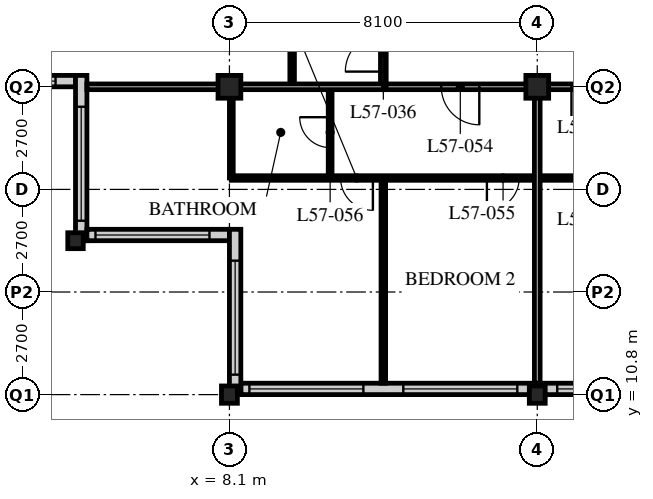
"""IFC4 building model, lengths in metres.
Left out: names, types, materials, properties, quantities, classifications, styles, units other than length and angle.
Written with IfcOpenShell. Run it as: python <this file> out.ifc"""

import sys

from ifc_helpers import new_model, si_unit, direction, frame, frame_2d, origin, origin_2d, place, context, subcontext, project, spatial, rectangle, hollow_rectangle, i_section, extrude, element, fill, save


model = new_model("IFC4")
c1 = context("Model", 3, precision=1e-05, world=origin(), true_north=direction((0.0, 1.0)))
c2 = subcontext(c1, "Body", "Model", "MODEL_VIEW")
j1 = project(units=[si_unit("LENGTHUNIT", "METRE"), si_unit("PLANEANGLEUNIT", "RADIAN")], contexts=[c1])
p1 = place(None, origin())
s1 = spatial("IfcSite", under=j1, at=p1, CompositionType="ELEMENT")
p2 = place(p1, origin())
s2 = spatial("IfcBuilding", under=s1, at=p2, CompositionType="ELEMENT")
p3 = place(p2, frame((0.0, 0.0, 220.8)))
s3 = spatial("IfcBuildingStorey", under=s2, at=p3, CompositionType="ELEMENT", Elevation=220.8)
p4 = place(p3, frame((4.05, 14.85, 0.0), z_axis=(0.0, 0.0, 1.0), x_axis=(1.0, 0.0, 0.0)))
e1 = element("IfcColumn", 1, at=p4, inside=s3, PredefinedType="COLUMN", context=c2, shape_type="SweptSolid", body=[
    extrude(i_section(OverallWidth=0.407, OverallDepth=0.419, WebThickness=0.031, FlangeThickness=0.049, FilletRadius=0.015, at=origin_2d()), origin(), (0.0, 0.0, 1.0), 3.6),
])
p5 = place(p3, frame((8.1, 10.8, 0.0), z_axis=(0.0, 0.0, 1.0), x_axis=(1.0, 0.0, 0.0)))
e2 = element("IfcColumn", 2, at=p5, inside=s3, PredefinedType="COLUMN", context=c2, shape_type="SweptSolid", body=[
    extrude(i_section(OverallWidth=0.418, OverallDepth=0.456, WebThickness=0.042, FlangeThickness=0.067, FilletRadius=0.015, at=origin_2d()), origin(), (0.0, 0.0, 1.0), 3.6),
])
p6 = place(p3, frame((8.1, 18.9, 0.0), z_axis=(0.0, 0.0, 1.0), x_axis=(1.0, 0.0, 0.0)))
e3 = element("IfcColumn", 3, at=p6, inside=s3, PredefinedType="COLUMN", context=c2, shape_type="SweptSolid", body=[
    extrude(hollow_rectangle(XDim=0.6, YDim=0.6, WallThickness=0.05, at=origin_2d()), origin(), (0.0, 0.0, 1.0), 3.6),
])
p7 = place(p3, frame((16.2, 10.8, 0.0), z_axis=(0.0, 0.0, 1.0), x_axis=(1.0, 0.0, 0.0)))
e4 = element("IfcColumn", 4, at=p7, inside=s3, PredefinedType="COLUMN", context=c2, shape_type="SweptSolid", body=[
    extrude(i_section(OverallWidth=0.418, OverallDepth=0.456, WebThickness=0.042, FlangeThickness=0.067, FilletRadius=0.015, at=origin_2d()), origin(), (0.0, 0.0, 1.0), 3.6),
])
p8 = place(p3, frame((16.2, 18.9, 0.0), z_axis=(0.0, 0.0, 1.0), x_axis=(1.0, 0.0, 0.0)))
e5 = element("IfcColumn", 5, at=p8, inside=s3, PredefinedType="COLUMN", context=c2, shape_type="SweptSolid", body=[
    extrude(hollow_rectangle(XDim=0.6, YDim=0.6, WallThickness=0.05, at=origin_2d()), origin(), (0.0, 0.0, 1.0), 3.6),
])
p9 = place(p3, frame((8.4, 10.95, 0.0), z_axis=(0.0, 0.0, 1.0), x_axis=(1.0, 0.0, 0.0)))
e6 = element("IfcWall", 6, at=p9, inside=s3, PredefinedType="SOLIDWALL", context=c2, shape_type="SweptSolid", body=[
    extrude(rectangle(XDim=40.2, YDim=0.3, at=frame_2d((20.1, 0.0))), origin(), (0.0, 0.0, 1.0), 3.39),
])
p10 = place(p9, frame((0.225, 0.0, 0.6)))
e7 = element("IfcOpeningElement", 7, at=p10, cuts=e6, PredefinedType="OPENING", context=c2, shape_type="SweptSolid", body=[
    extrude(rectangle(XDim=3.0, YDim=2.0, at=frame_2d((1.5, 1.0))), frame((0.0, 0.16, 0.0), z_axis=(0.0, -1.0, 0.0), x_axis=(1.0, 0.0, 0.0)), (0.0, 0.0, 1.0), 0.32),
])
p11 = place(p9, frame((4.275, 0.0, 0.6)))
e8 = element("IfcOpeningElement", 8, at=p11, cuts=e6, PredefinedType="OPENING", context=c2, shape_type="SweptSolid", body=[
    extrude(rectangle(XDim=3.0, YDim=2.0, at=frame_2d((1.5, 1.0))), frame((0.0, 0.16, 0.0), z_axis=(0.0, -1.0, 0.0), x_axis=(1.0, 0.0, 0.0)), (0.0, 0.0, 1.0), 0.32),
])
p12 = place(p9, frame((8.325, 0.0, 0.6)))
e9 = element("IfcOpeningElement", 9, at=p12, cuts=e6, PredefinedType="OPENING", context=c2, shape_type="SweptSolid", body=[
    extrude(rectangle(XDim=3.0, YDim=2.0, at=frame_2d((1.5, 1.0))), frame((0.0, 0.16, 0.0), z_axis=(0.0, -1.0, 0.0), x_axis=(1.0, 0.0, 0.0)), (0.0, 0.0, 1.0), 0.32),
])
p13 = place(p9, frame((12.375, 0.0, 0.6)))
e10 = element("IfcOpeningElement", 10, at=p13, cuts=e6, PredefinedType="OPENING", context=c2, shape_type="SweptSolid", body=[
    extrude(rectangle(XDim=3.0, YDim=2.0, at=frame_2d((1.5, 1.0))), frame((0.0, 0.16, 0.0), z_axis=(0.0, -1.0, 0.0), x_axis=(1.0, 0.0, 0.0)), (0.0, 0.0, 1.0), 0.32),
])
p14 = place(p9, frame((16.425, 0.0, 0.6)))
e11 = element("IfcOpeningElement", 11, at=p14, cuts=e6, PredefinedType="OPENING", context=c2, shape_type="SweptSolid", body=[
    extrude(rectangle(XDim=3.0, YDim=2.0, at=frame_2d((1.5, 1.0))), frame((0.0, 0.16, 0.0), z_axis=(0.0, -1.0, 0.0), x_axis=(1.0, 0.0, 0.0)), (0.0, 0.0, 1.0), 0.32),
])
p15 = place(p9, frame((20.475, 0.0, 0.6)))
e12 = element("IfcOpeningElement", 12, at=p15, cuts=e6, PredefinedType="OPENING", context=c2, shape_type="SweptSolid", body=[
    extrude(rectangle(XDim=3.0, YDim=2.0, at=frame_2d((1.5, 1.0))), frame((0.0, 0.16, 0.0), z_axis=(0.0, -1.0, 0.0), x_axis=(1.0, 0.0, 0.0)), (0.0, 0.0, 1.0), 0.32),
])
p16 = place(p9, frame((24.525, 0.0, 0.6)))
e13 = element("IfcOpeningElement", 13, at=p16, cuts=e6, PredefinedType="OPENING", context=c2, shape_type="SweptSolid", body=[
    extrude(rectangle(XDim=3.0, YDim=2.0, at=frame_2d((1.5, 1.0))), frame((0.0, 0.16, 0.0), z_axis=(0.0, -1.0, 0.0), x_axis=(1.0, 0.0, 0.0)), (0.0, 0.0, 1.0), 0.32),
])
p17 = place(p9, frame((28.575, 0.0, 0.6)))
e14 = element("IfcOpeningElement", 14, at=p17, cuts=e6, PredefinedType="OPENING", context=c2, shape_type="SweptSolid", body=[
    extrude(rectangle(XDim=3.0, YDim=2.0, at=frame_2d((1.5, 1.0))), frame((0.0, 0.16, 0.0), z_axis=(0.0, -1.0, 0.0), x_axis=(1.0, 0.0, 0.0)), (0.0, 0.0, 1.0), 0.32),
])
p18 = place(p9, frame((32.625, 0.0, 0.6)))
e15 = element("IfcOpeningElement", 15, at=p18, cuts=e6, PredefinedType="OPENING", context=c2, shape_type="SweptSolid", body=[
    extrude(rectangle(XDim=3.0, YDim=2.0, at=frame_2d((1.5, 1.0))), frame((0.0, 0.16, 0.0), z_axis=(0.0, -1.0, 0.0), x_axis=(1.0, 0.0, 0.0)), (0.0, 0.0, 1.0), 0.32),
])
p19 = place(p9, frame((36.675, 0.0, 0.6)))
e16 = element("IfcOpeningElement", 16, at=p19, cuts=e6, PredefinedType="OPENING", context=c2, shape_type="SweptSolid", body=[
    extrude(rectangle(XDim=3.0, YDim=2.0, at=frame_2d((1.5, 1.0))), frame((0.0, 0.16, 0.0), z_axis=(0.0, -1.0, 0.0), x_axis=(1.0, 0.0, 0.0)), (0.0, 0.0, 1.0), 0.32),
])
p20 = place(p3, frame((0.3, 19.05, 0.0), z_axis=(0.0, 0.0, 1.0), x_axis=(1.0, 0.0, 0.0)))
e17 = element("IfcWall", 17, at=p20, inside=s3, PredefinedType="SOLIDWALL", context=c2, shape_type="SweptSolid", body=[
    extrude(rectangle(XDim=3.75, YDim=0.3, at=frame_2d((1.875, 0.0))), origin(), (0.0, 0.0, 1.0), 3.39),
])
p21 = place(p20, frame((0.225, 0.0, 0.6)))
e18 = element("IfcOpeningElement", 18, at=p21, cuts=e17, PredefinedType="OPENING", context=c2, shape_type="SweptSolid", body=[
    extrude(rectangle(XDim=3.0, YDim=2.0, at=frame_2d((1.5, 1.0))), frame((0.0, 0.16, 0.0), z_axis=(0.0, -1.0, 0.0), x_axis=(1.0, 0.0, 0.0)), (0.0, 0.0, 1.0), 0.32),
])
p22 = place(p3, frame((4.2, 19.2, 0.0), z_axis=(0.0, 0.0, 1.0), x_axis=(0.0, -1.0, 0.0)))
e19 = element("IfcWall", 19, at=p22, inside=s3, PredefinedType="SOLIDWALL", context=c2, shape_type="SweptSolid", body=[
    extrude(rectangle(XDim=4.35, YDim=0.3, at=frame_2d((2.175, 0.0))), origin(), (0.0, 0.0, 1.0), 3.39),
])
p23 = place(p22, frame((0.825, 0.0, 0.6)))
e20 = element("IfcOpeningElement", 20, at=p23, cuts=e19, PredefinedType="OPENING", context=c2, shape_type="SweptSolid", body=[
    extrude(rectangle(XDim=3.0, YDim=2.0, at=frame_2d((1.5, 1.0))), frame((0.0, 0.16, 0.0), z_axis=(0.0, -1.0, 0.0), x_axis=(1.0, 0.0, 0.0)), (0.0, 0.0, 1.0), 0.32),
])
p24 = place(p3, frame((4.35, 15.0, 0.0), z_axis=(0.0, 0.0, 1.0), x_axis=(1.0, 0.0, 0.0)))
e21 = element("IfcWall", 21, at=p24, inside=s3, PredefinedType="SOLIDWALL", context=c2, shape_type="SweptSolid", body=[
    extrude(rectangle(XDim=3.75, YDim=0.3, at=frame_2d((1.875, 0.0))), origin(), (0.0, 0.0, 1.0), 3.39),
])
p25 = place(p24, frame((0.225, 0.0, 0.6)))
e22 = element("IfcOpeningElement", 22, at=p25, cuts=e21, PredefinedType="OPENING", context=c2, shape_type="SweptSolid", body=[
    extrude(rectangle(XDim=3.0, YDim=2.0, at=frame_2d((1.5, 1.0))), frame((0.0, 0.16, 0.0), z_axis=(0.0, -1.0, 0.0), x_axis=(1.0, 0.0, 0.0)), (0.0, 0.0, 1.0), 0.32),
])
p26 = place(p3, frame((8.25, 15.15, 0.0), z_axis=(0.0, 0.0, 1.0), x_axis=(0.0, -1.0, 0.0)))
e23 = element("IfcWall", 23, at=p26, inside=s3, PredefinedType="SOLIDWALL", context=c2, shape_type="SweptSolid", body=[
    extrude(rectangle(XDim=4.35, YDim=0.3, at=frame_2d((2.175, 0.0))), origin(), (0.0, 0.0, 1.0), 3.39),
])
p27 = place(p26, frame((0.825, 0.0, 0.6)))
e24 = element("IfcOpeningElement", 24, at=p27, cuts=e23, PredefinedType="OPENING", context=c2, shape_type="SweptSolid", body=[
    extrude(rectangle(XDim=3.0, YDim=2.0, at=frame_2d((1.5, 1.0))), frame((0.0, 0.16, 0.0), z_axis=(0.0, -1.0, 0.0), x_axis=(1.0, 0.0, 0.0)), (0.0, 0.0, 1.0), 0.32),
])
p28 = place(p3, frame((12.15, 18.9, 0.0), z_axis=(0.0, 0.0, 1.0), x_axis=(1.0, 0.0, 0.0)))
e25 = element("IfcWall", 25, at=p28, inside=s3, PredefinedType="PARTITIONING", context=c2, shape_type="SweptSolid", body=[
    extrude(rectangle(XDim=36.45, YDim=0.15, at=frame_2d((18.225, 0.0))), origin(), (0.0, 0.0, 1.0), 2.628),
])
p29 = place(p28, frame((4.95, 0.0, 0.0)))
e26 = element("IfcOpeningElement", 26, at=p29, cuts=e25, PredefinedType="OPENING", context=c2, shape_type="SweptSolid", body=[
    extrude(rectangle(XDim=1.0, YDim=2.1, at=frame_2d((0.5, 1.05))), frame((0.0, 0.085, 0.0), z_axis=(0.0, -1.0, 0.0), x_axis=(1.0, 0.0, 0.0)), (0.0, 0.0, 1.0), 0.17),
])
p30 = place(p28, frame((22.6, 0.0, 0.0)))
e27 = element("IfcOpeningElement", 27, at=p30, cuts=e25, PredefinedType="OPENING", context=c2, shape_type="SweptSolid", body=[
    extrude(rectangle(XDim=1.0, YDim=2.1, at=frame_2d((0.5, 1.05))), frame((0.0, 0.085, 0.0), z_axis=(0.0, -1.0, 0.0), x_axis=(1.0, 0.0, 0.0)), (0.0, 0.0, 1.0), 0.17),
])
p31 = place(p28, frame((25.0, 0.0, 0.0)))
e28 = element("IfcOpeningElement", 28, at=p31, cuts=e25, PredefinedType="OPENING", context=c2, shape_type="SweptSolid", body=[
    extrude(rectangle(XDim=1.0, YDim=2.1, at=frame_2d((0.5, 1.05))), frame((0.0, 0.085, 0.0), z_axis=(0.0, -1.0, 0.0), x_axis=(1.0, 0.0, 0.0)), (0.0, 0.0, 1.0), 0.17),
])
p32 = place(p28, frame((30.7, 0.0, 0.0)))
e29 = element("IfcOpeningElement", 29, at=p32, cuts=e25, PredefinedType="OPENING", context=c2, shape_type="SweptSolid", body=[
    extrude(rectangle(XDim=1.0, YDim=2.1, at=frame_2d((0.5, 1.05))), frame((0.0, 0.085, 0.0), z_axis=(0.0, -1.0, 0.0), x_axis=(1.0, 0.0, 0.0)), (0.0, 0.0, 1.0), 0.17),
])
p33 = place(p28, frame((1.525, 0.0, 0.0)))
e30 = element("IfcOpeningElement", 30, at=p33, cuts=e25, PredefinedType="OPENING", context=c2, shape_type="SweptSolid", body=[
    extrude(rectangle(XDim=1.0, YDim=2.1, at=frame_2d((0.5, 1.05))), frame((0.0, 0.085, 0.0), z_axis=(0.0, -1.0, 0.0), x_axis=(1.0, 0.0, 0.0)), (0.0, 0.0, 1.0), 0.17),
])
p34 = place(p28, frame((32.825, 0.0, 0.0)))
e31 = element("IfcOpeningElement", 31, at=p34, cuts=e25, PredefinedType="OPENING", context=c2, shape_type="SweptSolid", body=[
    extrude(rectangle(XDim=1.0, YDim=2.1, at=frame_2d((0.5, 1.05))), frame((0.0, 0.085, 0.0), z_axis=(0.0, -1.0, 0.0), x_axis=(1.0, 0.0, 0.0)), (0.0, 0.0, 1.0), 0.17),
])
p35 = place(p3, frame((12.15, 18.9, 0.0), z_axis=(0.0, 0.0, 1.0), x_axis=(0.0, 1.0, 0.0)))
e32 = element("IfcWall", 32, at=p35, inside=s3, PredefinedType="PARTITIONING", context=c2, shape_type="SweptSolid", body=[
    extrude(rectangle(XDim=24.3, YDim=0.15, at=frame_2d((12.15, 0.0))), origin(), (0.0, 0.0, 1.0), 3.39),
])
p36 = place(p35, frame((0.4, 0.0, 0.0)))
e33 = element("IfcOpeningElement", 33, at=p36, cuts=e32, PredefinedType="OPENING", context=c2, shape_type="SweptSolid", body=[
    extrude(rectangle(XDim=1.0, YDim=2.1, at=frame_2d((0.5, 1.05))), frame((0.0, 0.085, 0.0), z_axis=(0.0, -1.0, 0.0), x_axis=(1.0, 0.0, 0.0)), (0.0, 0.0, 1.0), 0.17),
])
p37 = place(p35, frame((16.6, 0.0, 0.0)))
e34 = element("IfcOpeningElement", 34, at=p37, cuts=e32, PredefinedType="OPENING", context=c2, shape_type="SweptSolid", body=[
    extrude(rectangle(XDim=1.0, YDim=2.1, at=frame_2d((0.5, 1.05))), frame((0.0, 0.085, 0.0), z_axis=(0.0, -1.0, 0.0), x_axis=(1.0, 0.0, 0.0)), (0.0, 0.0, 1.0), 0.17),
])
p38 = place(p3, frame((9.75, 18.9, 0.0), z_axis=(0.0, 0.0, 1.0), x_axis=(0.0, 1.0, 0.0)))
e35 = element("IfcWall", 35, at=p38, inside=s3, PredefinedType="PARTITIONING", context=c2, shape_type="SweptSolid", body=[
    extrude(rectangle(XDim=24.3, YDim=0.12, at=frame_2d((12.15, 0.0))), origin(), (0.0, 0.0, 1.0), 3.39),
])
p39 = place(p38, frame((0.975, 0.0, 0.0)))
e36 = element("IfcOpeningElement", 36, at=p39, cuts=e35, PredefinedType="OPENING", context=c2, shape_type="SweptSolid", body=[
    extrude(rectangle(XDim=0.85, YDim=2.1, at=frame_2d((0.425, 1.05))), frame((0.0, 0.07, 0.0), z_axis=(0.0, -1.0, 0.0), x_axis=(1.0, 0.0, 0.0)), (0.0, 0.0, 1.0), 0.14),
])
p40 = place(p38, frame((8.425, 0.0, 0.0)))
e37 = element("IfcOpeningElement", 37, at=p40, cuts=e35, PredefinedType="OPENING", context=c2, shape_type="SweptSolid", body=[
    extrude(rectangle(XDim=0.85, YDim=2.1, at=frame_2d((0.425, 1.05))), frame((0.0, 0.07, 0.0), z_axis=(0.0, -1.0, 0.0), x_axis=(1.0, 0.0, 0.0)), (0.0, 0.0, 1.0), 0.14),
])
p41 = place(p38, frame((12.475, 0.0, 0.0)))
e38 = element("IfcOpeningElement", 38, at=p41, cuts=e35, PredefinedType="OPENING", context=c2, shape_type="SweptSolid", body=[
    extrude(rectangle(XDim=0.85, YDim=2.1, at=frame_2d((0.425, 1.05))), frame((0.0, 0.07, 0.0), z_axis=(0.0, -1.0, 0.0), x_axis=(1.0, 0.0, 0.0)), (0.0, 0.0, 1.0), 0.14),
])
p42 = place(p38, frame((17.175, 0.0, 0.0)))
e39 = element("IfcOpeningElement", 39, at=p42, cuts=e35, PredefinedType="OPENING", context=c2, shape_type="SweptSolid", body=[
    extrude(rectangle(XDim=0.85, YDim=2.1, at=frame_2d((0.425, 1.05))), frame((0.0, 0.07, 0.0), z_axis=(0.0, -1.0, 0.0), x_axis=(1.0, 0.0, 0.0)), (0.0, 0.0, 1.0), 0.14),
])
p43 = place(p38, frame((20.575, 0.0, 0.0)))
e40 = element("IfcOpeningElement", 40, at=p43, cuts=e35, PredefinedType="OPENING", context=c2, shape_type="SweptSolid", body=[
    extrude(rectangle(XDim=0.85, YDim=2.1, at=frame_2d((0.425, 1.05))), frame((0.0, 0.07, 0.0), z_axis=(0.0, -1.0, 0.0), x_axis=(1.0, 0.0, 0.0)), (0.0, 0.0, 1.0), 0.14),
])
p44 = place(p3, frame((10.75, 18.9, 0.0), z_axis=(0.0, 0.0, 1.0), x_axis=(0.0, -1.0, 0.0)))
e41 = element("IfcWall", 41, at=p44, inside=s3, PredefinedType="PARTITIONING", context=c2, shape_type="SweptSolid", body=[
    extrude(rectangle(XDim=2.4, YDim=0.1, at=frame_2d((1.2, 0.0))), origin(), (0.0, 0.0, 1.0), 3.39),
])
p45 = place(p44, frame((0.8, 0.0, 0.0)))
e42 = element("IfcOpeningElement", 42, at=p45, cuts=e41, PredefinedType="OPENING", context=c2, shape_type="SweptSolid", body=[
    extrude(rectangle(XDim=0.8, YDim=2.1, at=frame_2d((0.4, 1.05))), frame((0.0, 0.06, 0.0), z_axis=(0.0, -1.0, 0.0), x_axis=(1.0, 0.0, 0.0)), (0.0, 0.0, 1.0), 0.12),
])
p46 = place(p3, frame((8.15, 18.9, 0.0), z_axis=(0.0, 0.0, 1.0), x_axis=(0.0, -1.0, 0.0)))
e43 = element("IfcWall", 43, at=p46, inside=s3, PredefinedType="PARTITIONING", context=c2, shape_type="SweptSolid", body=[
    extrude(rectangle(XDim=2.4, YDim=0.1, at=frame_2d((1.2, 0.0))), origin(), (0.0, 0.0, 1.0), 2.628),
])
p47 = place(p3, frame((8.15, 16.5, 0.0), z_axis=(0.0, 0.0, 1.0), x_axis=(1.0, 0.0, 0.0)))
e44 = element("IfcWall", 44, at=p47, inside=s3, PredefinedType="PARTITIONING", context=c2, shape_type="SweptSolid", body=[
    extrude(rectangle(XDim=24.25, YDim=0.12, at=frame_2d((12.125, 0.0))), origin(), (0.0, 0.0, 1.0), 3.39),
])
p48 = place(p47, frame((9.025, 0.0, 0.0)))
e45 = element("IfcOpeningElement", 45, at=p48, cuts=e44, PredefinedType="OPENING", context=c2, shape_type="SweptSolid", body=[
    extrude(rectangle(XDim=0.85, YDim=2.1, at=frame_2d((0.425, 1.05))), frame((0.0, 0.07, 0.0), z_axis=(0.0, -1.0, 0.0), x_axis=(1.0, 0.0, 0.0)), (0.0, 0.0, 1.0), 0.14),
])
p49 = place(p47, frame((16.475, 0.0, 0.0)))
e46 = element("IfcOpeningElement", 46, at=p49, cuts=e44, PredefinedType="OPENING", context=c2, shape_type="SweptSolid", body=[
    extrude(rectangle(XDim=0.85, YDim=2.1, at=frame_2d((0.425, 1.05))), frame((0.0, 0.07, 0.0), z_axis=(0.0, -1.0, 0.0), x_axis=(1.0, 0.0, 0.0)), (0.0, 0.0, 1.0), 0.14),
])
p50 = place(p47, frame((20.525, 0.0, 0.0)))
e47 = element("IfcOpeningElement", 47, at=p50, cuts=e44, PredefinedType="OPENING", context=c2, shape_type="SweptSolid", body=[
    extrude(rectangle(XDim=0.85, YDim=2.1, at=frame_2d((0.425, 1.05))), frame((0.0, 0.07, 0.0), z_axis=(0.0, -1.0, 0.0), x_axis=(1.0, 0.0, 0.0)), (0.0, 0.0, 1.0), 0.14),
])
p51 = place(p47, frame((6.725, 0.0, 0.0)))
e48 = element("IfcOpeningElement", 48, at=p51, cuts=e44, PredefinedType="OPENING", context=c2, shape_type="SweptSolid", body=[
    extrude(rectangle(XDim=0.85, YDim=2.1, at=frame_2d((0.425, 1.05))), frame((0.0, 0.07, 0.0), z_axis=(0.0, -1.0, 0.0), x_axis=(1.0, 0.0, 0.0)), (0.0, 0.0, 1.0), 0.14),
])
p52 = place(p47, frame((2.875, 0.0, 0.0)))
e49 = element("IfcOpeningElement", 49, at=p52, cuts=e44, PredefinedType="OPENING", context=c2, shape_type="SweptSolid", body=[
    extrude(rectangle(XDim=0.85, YDim=2.1, at=frame_2d((0.425, 1.05))), frame((0.0, 0.07, 0.0), z_axis=(0.0, -1.0, 0.0), x_axis=(1.0, 0.0, 0.0)), (0.0, 0.0, 1.0), 0.14),
])
p53 = place(p3, frame((12.15, 16.5, 0.0), z_axis=(0.0, 0.0, 1.0), x_axis=(0.0, -1.0, 0.0)))
e50 = element("IfcWall", 50, at=p53, inside=s3, PredefinedType="PARTITIONING", context=c2, shape_type="SweptSolid", body=[
    extrude(rectangle(XDim=5.4, YDim=0.12, at=frame_2d((2.7, 0.0))), origin(), (0.0, 0.0, 1.0), 3.39),
])
for number, where, z_axis, x_axis in (
    (51, (4.35, 18.9, 0.0), (0.0, 0.0, 1.0), (1.0, 0.0, 0.0)),
    (52, (16.2, 18.9, 0.0), (0.0, 0.0, 1.0), (0.0, -1.0, 0.0)),
):
    element("IfcWall", number, at=place(p3, frame(where, z_axis=z_axis, x_axis=x_axis)), inside=s3, PredefinedType="PARTITIONING", context=c2, shape_type="SweptSolid", body=[
        extrude(rectangle(XDim=7.8, YDim=0.15, at=frame_2d((3.9, 0.0))), origin(), (0.0, 0.0, 1.0), 2.628),
    ])
p54 = place(p10, origin())
e53 = element("IfcWindow", 53, at=p54, inside=s3, PartitioningType="SINGLE_PANEL", PredefinedType="WINDOW", context=c2, shape_type="SweptSolid", body=[
    extrude(rectangle(XDim=3.0, YDim=2.0, at=frame_2d((1.5, 1.0))), frame((0.0, 0.03, 0.0), z_axis=(0.0, -1.0, 0.0), x_axis=(1.0, 0.0, 0.0)), (0.0, 0.0, 1.0), 0.06),
])
fill(e7, e53)
p55 = place(p11, origin())
e54 = element("IfcWindow", 54, at=p55, inside=s3, PartitioningType="SINGLE_PANEL", PredefinedType="WINDOW", context=c2, shape_type="SweptSolid", body=[
    extrude(rectangle(XDim=3.0, YDim=2.0, at=frame_2d((1.5, 1.0))), frame((0.0, 0.03, 0.0), z_axis=(0.0, -1.0, 0.0), x_axis=(1.0, 0.0, 0.0)), (0.0, 0.0, 1.0), 0.06),
])
fill(e8, e54)
p56 = place(p12, origin())
e55 = element("IfcWindow", 55, at=p56, inside=s3, PartitioningType="SINGLE_PANEL", PredefinedType="WINDOW", context=c2, shape_type="SweptSolid", body=[
    extrude(rectangle(XDim=3.0, YDim=2.0, at=frame_2d((1.5, 1.0))), frame((0.0, 0.03, 0.0), z_axis=(0.0, -1.0, 0.0), x_axis=(1.0, 0.0, 0.0)), (0.0, 0.0, 1.0), 0.06),
])
fill(e9, e55)
p57 = place(p21, origin())
e56 = element("IfcWindow", 56, at=p57, inside=s3, PartitioningType="SINGLE_PANEL", PredefinedType="WINDOW", context=c2, shape_type="SweptSolid", body=[
    extrude(rectangle(XDim=3.0, YDim=2.0, at=frame_2d((1.5, 1.0))), frame((0.0, 0.03, 0.0), z_axis=(0.0, -1.0, 0.0), x_axis=(1.0, 0.0, 0.0)), (0.0, 0.0, 1.0), 0.06),
])
fill(e18, e56)
p58 = place(p23, origin())
e57 = element("IfcWindow", 57, at=p58, inside=s3, PartitioningType="SINGLE_PANEL", PredefinedType="WINDOW", context=c2, shape_type="SweptSolid", body=[
    extrude(rectangle(XDim=3.0, YDim=2.0, at=frame_2d((1.5, 1.0))), frame((0.0, 0.03, 0.0), z_axis=(0.0, -1.0, 0.0), x_axis=(1.0, 0.0, 0.0)), (0.0, 0.0, 1.0), 0.06),
])
fill(e20, e57)
p59 = place(p25, origin())
e58 = element("IfcWindow", 58, at=p59, inside=s3, PartitioningType="SINGLE_PANEL", PredefinedType="WINDOW", context=c2, shape_type="SweptSolid", body=[
    extrude(rectangle(XDim=3.0, YDim=2.0, at=frame_2d((1.5, 1.0))), frame((0.0, 0.03, 0.0), z_axis=(0.0, -1.0, 0.0), x_axis=(1.0, 0.0, 0.0)), (0.0, 0.0, 1.0), 0.06),
])
fill(e22, e58)
p60 = place(p27, origin())
e59 = element("IfcWindow", 59, at=p60, inside=s3, PartitioningType="SINGLE_PANEL", PredefinedType="WINDOW", context=c2, shape_type="SweptSolid", body=[
    extrude(rectangle(XDim=3.0, YDim=2.0, at=frame_2d((1.5, 1.0))), frame((0.0, 0.03, 0.0), z_axis=(0.0, -1.0, 0.0), x_axis=(1.0, 0.0, 0.0)), (0.0, 0.0, 1.0), 0.06),
])
fill(e24, e59)
p61 = place(p29, origin())
e60 = element("IfcDoor", 60, at=p61, inside=s3, OperationType="SINGLE_SWING_RIGHT", PredefinedType="DOOR", context=c2, shape_type="SweptSolid", body=[
    extrude(rectangle(XDim=1.0, YDim=2.1, at=frame_2d((0.5, 1.05))), frame((0.0, 0.025, 0.0), z_axis=(0.0, -1.0, 0.0), x_axis=(1.0, 0.0, 0.0)), (0.0, 0.0, 1.0), 0.05),
])
fill(e26, e60)
p62 = place(p36, origin())
e61 = element("IfcDoor", 61, at=p62, inside=s3, OperationType="SINGLE_SWING_LEFT", PredefinedType="DOOR", context=c2, shape_type="SweptSolid", body=[
    extrude(rectangle(XDim=1.0, YDim=2.1, at=frame_2d((0.5, 1.05))), frame((0.0, 0.025, 0.0), z_axis=(0.0, -1.0, 0.0), x_axis=(1.0, 0.0, 0.0)), (0.0, 0.0, 1.0), 0.05),
])
fill(e33, e61)
p63 = place(p33, origin())
e62 = element("IfcDoor", 62, at=p63, inside=s3, OperationType="SINGLE_SWING_LEFT", PredefinedType="DOOR", context=c2, shape_type="SweptSolid", body=[
    extrude(rectangle(XDim=1.0, YDim=2.1, at=frame_2d((0.5, 1.05))), frame((0.0, 0.025, 0.0), z_axis=(0.0, -1.0, 0.0), x_axis=(1.0, 0.0, 0.0)), (0.0, 0.0, 1.0), 0.05),
])
fill(e30, e62)
p64 = place(p51, origin())
e63 = element("IfcDoor", 63, at=p64, inside=s3, OperationType="SINGLE_SWING_RIGHT", PredefinedType="DOOR", context=c2, shape_type="SweptSolid", body=[
    extrude(rectangle(XDim=0.85, YDim=2.1, at=frame_2d((0.425, 1.05))), frame((0.0, 0.025, 0.0), z_axis=(0.0, -1.0, 0.0), x_axis=(1.0, 0.0, 0.0)), (0.0, 0.0, 1.0), 0.05),
])
fill(e48, e63)
p65 = place(p45, origin())
e64 = element("IfcDoor", 64, at=p65, inside=s3, OperationType="SINGLE_SWING_RIGHT", PredefinedType="DOOR", context=c2, shape_type="SweptSolid", body=[
    extrude(rectangle(XDim=0.8, YDim=2.1, at=frame_2d((0.4, 1.05))), frame((0.0, 0.025, 0.0), z_axis=(0.0, -1.0, 0.0), x_axis=(1.0, 0.0, 0.0)), (0.0, 0.0, 1.0), 0.05),
])
fill(e42, e64)
p66 = place(p52, origin())
e65 = element("IfcDoor", 65, at=p66, inside=s3, OperationType="SINGLE_SWING_LEFT", PredefinedType="DOOR", context=c2, shape_type="SweptSolid", body=[
    extrude(rectangle(XDim=0.85, YDim=2.1, at=frame_2d((0.425, 1.05))), frame((0.0, 0.025, 0.0), z_axis=(0.0, -1.0, 0.0), x_axis=(1.0, 0.0, 0.0)), (0.0, 0.0, 1.0), 0.05),
])
fill(e49, e65)
save(model, sys.argv[1])
